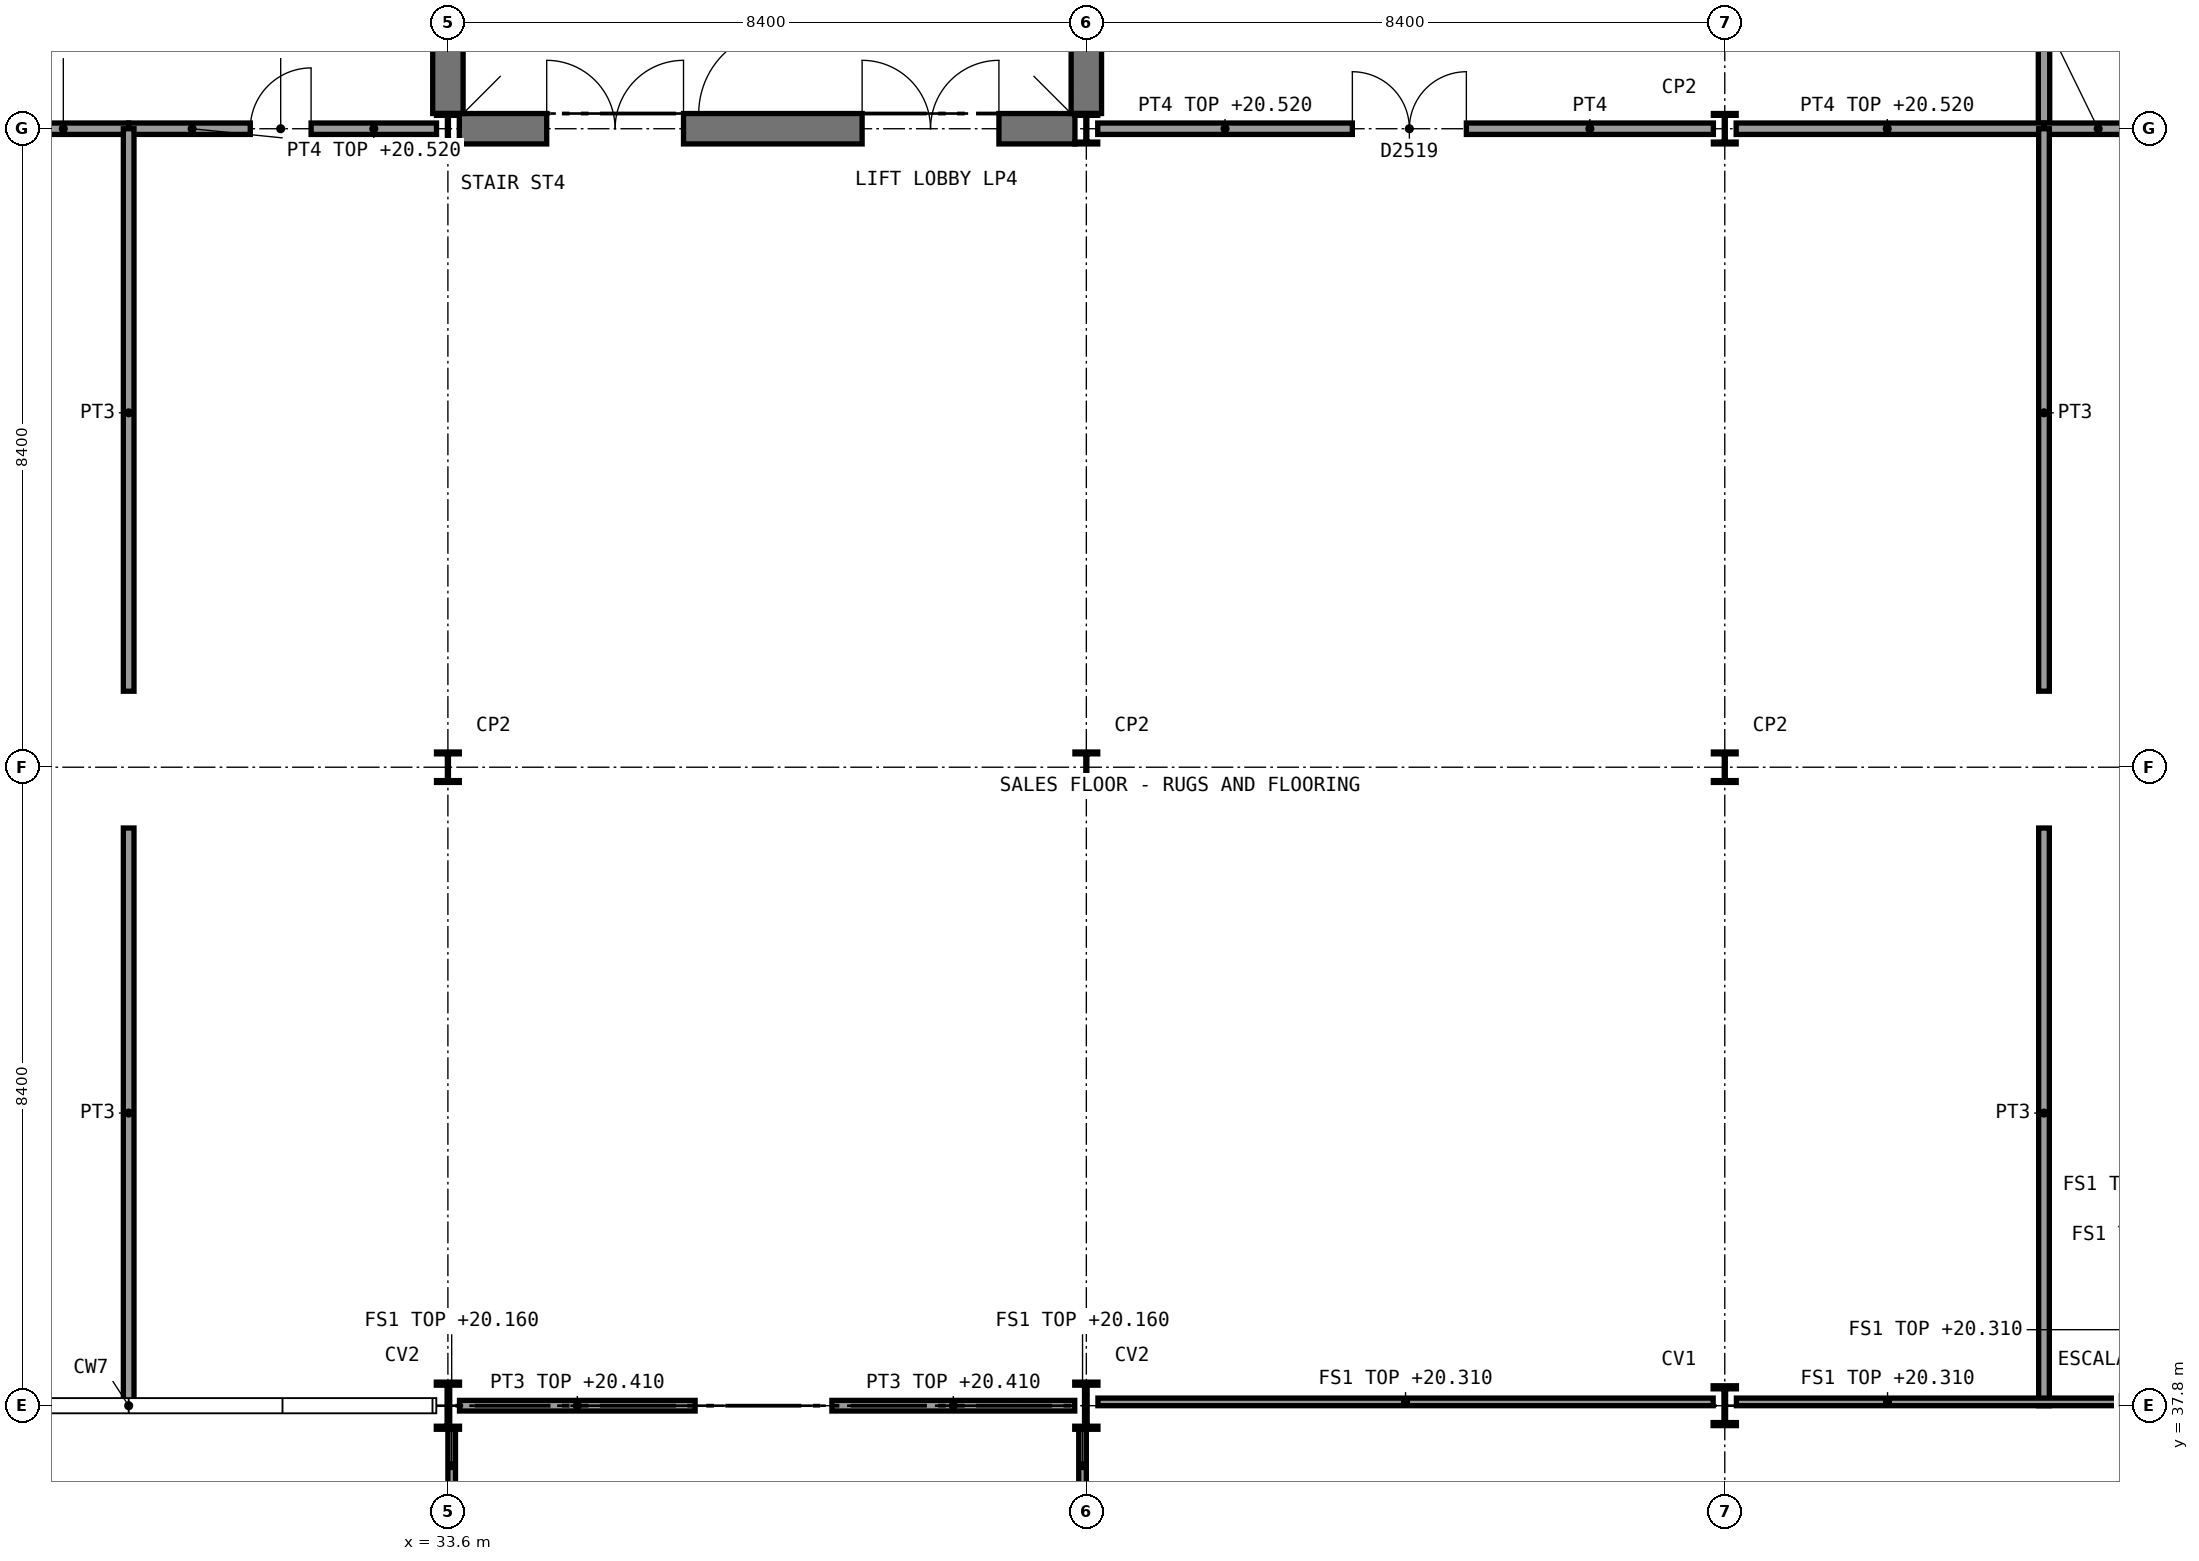
"""IFC4 building model, lengths in metres.
Left out: names, types, materials, properties, quantities, classifications, styles, units other than length and angle.
Written with IfcOpenShell. Run it as: python <this file> out.ifc"""

import sys

from ifc_helpers import new_model, si_unit, direction, frame, frame_2d, origin, origin_2d, place, context, subcontext, project, spatial, rectangle, i_section, extrude, element, fill, save


model = new_model("IFC4")
c1 = context("Model", 3, precision=1e-05, world=origin(), true_north=direction((0.0, 1.0)))
c2 = subcontext(c1, "Body", "Model", "MODEL_VIEW")
j1 = project(units=[si_unit("LENGTHUNIT", "METRE"), si_unit("PLANEANGLEUNIT", "RADIAN")], contexts=[c1])
p1 = place(None, origin())
s1 = spatial("IfcSite", under=j1, at=p1, CompositionType="ELEMENT")
p2 = place(p1, origin())
s2 = spatial("IfcBuilding", under=s1, at=p2, CompositionType="ELEMENT")
p3 = place(p2, frame((0.0, 0.0, 16.2)))
s3 = spatial("IfcBuildingStorey", under=s2, at=p3, CompositionType="ELEMENT", Elevation=16.2)
p4 = place(p3, frame((33.75, 54.6, 0.0), z_axis=(0.0, 0.0, 1.0), x_axis=(1.0, 0.0, 0.0)))
e1 = element("IfcWall", 1, at=p4, inside=s3, PredefinedType="SHEAR", context=c2, shape_type="SweptSolid", body=[
    extrude(rectangle(XDim=8.1, YDim=0.4, at=frame_2d((4.05, 0.0))), origin(), (0.0, 0.0, 1.0), 4.65),
])
p5 = place(p4, frame((1.15, 0.0, 0.0)))
e2 = element("IfcOpeningElement", 2, at=p5, cuts=e1, PredefinedType="OPENING", context=c2, shape_type="SweptSolid", body=[
    extrude(rectangle(XDim=1.8, YDim=2.1, at=frame_2d((0.9, 1.05))), frame((0.0, 0.21, 0.0), z_axis=(0.0, -1.0, 0.0), x_axis=(1.0, 0.0, 0.0)), (0.0, 0.0, 1.0), 0.42),
])
p6 = place(p4, frame((5.3, 0.0, 0.0)))
e3 = element("IfcOpeningElement", 3, at=p6, cuts=e1, PredefinedType="OPENING", context=c2, shape_type="SweptSolid", body=[
    extrude(rectangle(XDim=1.8, YDim=2.1, at=frame_2d((0.9, 1.05))), frame((0.0, 0.21, 0.0), z_axis=(0.0, -1.0, 0.0), x_axis=(1.0, 0.0, 0.0)), (0.0, 0.0, 1.0), 0.42),
])
for number, where, z_axis, x_axis in (
    (4, (33.6, 54.8, 0.0), (0.0, 0.0, 1.0), (0.0, 1.0, 0.0)),
    (5, (42.0, 54.8, 0.0), (0.0, 0.0, 1.0), (0.0, 1.0, 0.0)),
):
    element("IfcWall", number, at=place(p3, frame(where, z_axis=z_axis, x_axis=x_axis)), inside=s3, PredefinedType="SHEAR", context=c2, shape_type="SweptSolid", body=[
        extrude(rectangle(XDim=8.0, YDim=0.4, at=frame_2d((4.0, 0.0))), origin(), (0.0, 0.0, 1.0), 4.65),
    ])
p7 = place(p3, frame((33.6, 37.8, 0.0), z_axis=(0.0, 0.0, 1.0), x_axis=(1.0, 0.0, 0.0)))
e6 = element("IfcColumn", 6, at=p7, inside=s3, PredefinedType="COLUMN", context=c2, shape_type="SweptSolid", body=[
    extrude(i_section(OverallWidth=0.305, OverallDepth=0.62, WebThickness=0.021, FlangeThickness=0.04, FilletRadius=0.027, at=origin_2d()), origin(), (0.0, 0.0, 1.0), 4.8),
])
for number, where, z_axis, x_axis in (
    (7, (33.6, 46.2, 0.0), (0.0, 0.0, 1.0), (1.0, 0.0, 0.0)),
    (8, (33.6, 54.6, 0.0), (0.0, 0.0, 1.0), (1.0, 0.0, 0.0)),
):
    element("IfcColumn", number, at=place(p3, frame(where, z_axis=z_axis, x_axis=x_axis)), inside=s3, PredefinedType="COLUMN", context=c2, shape_type="SweptSolid", body=[
        extrude(i_section(OverallWidth=0.3, OverallDepth=0.4, WebThickness=0.013, FlangeThickness=0.024, FilletRadius=0.027, at=origin_2d()), origin(), (0.0, 0.0, 1.0), 4.8),
    ])
p8 = place(p3, frame((42.0, 37.8, 0.0), z_axis=(0.0, 0.0, 1.0), x_axis=(1.0, 0.0, 0.0)))
e9 = element("IfcColumn", 9, at=p8, inside=s3, PredefinedType="COLUMN", context=c2, shape_type="SweptSolid", body=[
    extrude(i_section(OverallWidth=0.305, OverallDepth=0.62, WebThickness=0.021, FlangeThickness=0.04, FilletRadius=0.027, at=origin_2d()), origin(), (0.0, 0.0, 1.0), 4.8),
])
for number, where, z_axis, x_axis in (
    (10, (42.0, 46.2, 0.0), (0.0, 0.0, 1.0), (1.0, 0.0, 0.0)),
    (11, (42.0, 54.6, 0.0), (0.0, 0.0, 1.0), (1.0, 0.0, 0.0)),
):
    element("IfcColumn", number, at=place(p3, frame(where, z_axis=z_axis, x_axis=x_axis)), inside=s3, PredefinedType="COLUMN", context=c2, shape_type="SweptSolid", body=[
        extrude(i_section(OverallWidth=0.3, OverallDepth=0.4, WebThickness=0.013, FlangeThickness=0.024, FilletRadius=0.027, at=origin_2d()), origin(), (0.0, 0.0, 1.0), 4.8),
    ])
p9 = place(p3, frame((50.4, 37.8, 0.0), z_axis=(0.0, 0.0, 1.0), x_axis=(1.0, 0.0, 0.0)))
e12 = element("IfcColumn", 12, at=p9, inside=s3, PredefinedType="COLUMN", context=c2, shape_type="SweptSolid", body=[
    extrude(i_section(OverallWidth=0.306, OverallDepth=0.524, WebThickness=0.021, FlangeThickness=0.04, FilletRadius=0.027, at=origin_2d()), origin(), (0.0, 0.0, 1.0), 4.8),
])
for number, where, z_axis, x_axis in (
    (13, (50.4, 46.2, 0.0), (0.0, 0.0, 1.0), (1.0, 0.0, 0.0)),
    (14, (50.4, 54.6, 0.0), (0.0, 0.0, 1.0), (1.0, 0.0, 0.0)),
):
    element("IfcColumn", number, at=place(p3, frame(where, z_axis=z_axis, x_axis=x_axis)), inside=s3, PredefinedType="COLUMN", context=c2, shape_type="SweptSolid", body=[
        extrude(i_section(OverallWidth=0.3, OverallDepth=0.4, WebThickness=0.013, FlangeThickness=0.024, FilletRadius=0.027, at=origin_2d()), origin(), (0.0, 0.0, 1.0), 4.8),
    ])
p10 = place(p3, frame((25.35, 54.6, 0.0), z_axis=(0.0, 0.0, 1.0), x_axis=(1.0, 0.0, 0.0)))
e15 = element("IfcWall", 15, at=p10, inside=s3, PredefinedType="SOLIDWALL", context=c2, shape_type="SweptSolid", body=[
    extrude(rectangle(XDim=4.05, YDim=0.15, at=frame_2d((2.025, 0.0))), origin(), (0.0, 0.0, 1.0), 4.32),
])
p11 = place(p10, frame((1.6, 0.0, 0.0)))
e16 = element("IfcOpeningElement", 16, at=p11, cuts=e15, PredefinedType="OPENING", context=c2, shape_type="SweptSolid", body=[
    extrude(rectangle(XDim=0.8, YDim=2.1, at=frame_2d((0.4, 1.05))), frame((0.0, 0.085, 0.0), z_axis=(0.0, -1.0, 0.0), x_axis=(1.0, 0.0, 0.0)), (0.0, 0.0, 1.0), 0.17),
])
p12 = place(p3, frame((29.4, 54.6, 0.0), z_axis=(0.0, 0.0, 1.0), x_axis=(1.0, 0.0, 0.0)))
e17 = element("IfcWall", 17, at=p12, inside=s3, PredefinedType="SOLIDWALL", context=c2, shape_type="SweptSolid", body=[
    extrude(rectangle(XDim=4.05, YDim=0.15, at=frame_2d((2.025, 0.0))), origin(), (0.0, 0.0, 1.0), 4.32),
])
p13 = place(p12, frame((1.6, 0.0, 0.0)))
e18 = element("IfcOpeningElement", 18, at=p13, cuts=e17, PredefinedType="OPENING", context=c2, shape_type="SweptSolid", body=[
    extrude(rectangle(XDim=0.8, YDim=2.1, at=frame_2d((0.4, 1.05))), frame((0.0, 0.085, 0.0), z_axis=(0.0, -1.0, 0.0), x_axis=(1.0, 0.0, 0.0)), (0.0, 0.0, 1.0), 0.17),
])
p14 = place(p3, frame((54.6, 54.6, 0.0), z_axis=(0.0, 0.0, 1.0), x_axis=(0.0, 1.0, 0.0)))
e19 = element("IfcWall", 19, at=p14, inside=s3, PredefinedType="SOLIDWALL", context=c2, shape_type="SweptSolid", body=[
    extrude(rectangle(XDim=8.4, YDim=0.15, at=frame_2d((4.2, 0.0))), origin(), (0.0, 0.0, 1.0), 4.65),
])
p15 = place(p3, frame((42.15, 54.6, 0.0), z_axis=(0.0, 0.0, 1.0), x_axis=(1.0, 0.0, 0.0)))
e20 = element("IfcWall", 20, at=p15, inside=s3, PredefinedType="SOLIDWALL", context=c2, shape_type="SweptSolid", body=[
    extrude(rectangle(XDim=8.1, YDim=0.15, at=frame_2d((4.05, 0.0))), origin(), (0.0, 0.0, 1.0), 4.32),
])
p16 = place(p15, frame((3.35, 0.0, 0.0)))
e21 = element("IfcOpeningElement", 21, at=p16, cuts=e20, PredefinedType="OPENING", context=c2, shape_type="SweptSolid", body=[
    extrude(rectangle(XDim=1.5, YDim=2.1, at=frame_2d((0.75, 1.05))), frame((0.0, 0.085, 0.0), z_axis=(0.0, -1.0, 0.0), x_axis=(1.0, 0.0, 0.0)), (0.0, 0.0, 1.0), 0.17),
])
p17 = place(p3, frame((50.55, 54.6, 0.0), z_axis=(0.0, 0.0, 1.0), x_axis=(1.0, 0.0, 0.0)))
e22 = element("IfcWall", 22, at=p17, inside=s3, PredefinedType="SOLIDWALL", context=c2, shape_type="SweptSolid", body=[
    extrude(rectangle(XDim=4.05, YDim=0.15, at=frame_2d((2.025, 0.0))), origin(), (0.0, 0.0, 1.0), 4.32),
])
p18 = place(p3, frame((54.6, 54.6, 0.0), z_axis=(0.0, 0.0, 1.0), x_axis=(1.0, 0.0, 0.0)))
e23 = element("IfcWall", 23, at=p18, inside=s3, PredefinedType="SOLIDWALL", context=c2, shape_type="SweptSolid", body=[
    extrude(rectangle(XDim=4.05, YDim=0.15, at=frame_2d((2.025, 0.0))), origin(), (0.0, 0.0, 1.0), 4.32),
])
p19 = place(p18, frame((1.35, 0.0, 0.0)))
e24 = element("IfcOpeningElement", 24, at=p19, cuts=e23, PredefinedType="OPENING", context=c2, shape_type="SweptSolid", body=[
    extrude(rectangle(XDim=1.5, YDim=2.1, at=frame_2d((0.75, 1.05))), frame((0.0, 0.085, 0.0), z_axis=(0.0, -1.0, 0.0), x_axis=(1.0, 0.0, 0.0)), (0.0, 0.0, 1.0), 0.17),
])
p20 = place(p3, frame((29.4, 37.8, 0.0), z_axis=(0.0, 0.0, 1.0), x_axis=(0.0, 1.0, 0.0)))
e25 = element("IfcWall", 25, at=p20, inside=s3, PredefinedType="PARTITIONING", context=c2, shape_type="SweptSolid", body=[
    extrude(rectangle(XDim=7.6, YDim=0.14, at=frame_2d((3.8, 0.0))), origin(), (0.0, 0.0, 1.0), 4.65),
])
p21 = place(p3, frame((29.4, 47.2, 0.0), z_axis=(0.0, 0.0, 1.0), x_axis=(0.0, 1.0, 0.0)))
e26 = element("IfcWall", 26, at=p21, inside=s3, PredefinedType="PARTITIONING", context=c2, shape_type="SweptSolid", body=[
    extrude(rectangle(XDim=7.4, YDim=0.14, at=frame_2d((3.7, 0.0))), origin(), (0.0, 0.0, 1.0), 4.65),
])
p22 = place(p3, frame((54.6, 37.8, 0.0), z_axis=(0.0, 0.0, 1.0), x_axis=(0.0, 1.0, 0.0)))
e27 = element("IfcWall", 27, at=p22, inside=s3, PredefinedType="PARTITIONING", context=c2, shape_type="SweptSolid", body=[
    extrude(rectangle(XDim=7.6, YDim=0.14, at=frame_2d((3.8, 0.0))), origin(), (0.0, 0.0, 1.0), 4.65),
])
p23 = place(p3, frame((54.6, 47.2, 0.0), z_axis=(0.0, 0.0, 1.0), x_axis=(0.0, 1.0, 0.0)))
e28 = element("IfcWall", 28, at=p23, inside=s3, PredefinedType="PARTITIONING", context=c2, shape_type="SweptSolid", body=[
    extrude(rectangle(XDim=7.4, YDim=0.14, at=frame_2d((3.7, 0.0))), origin(), (0.0, 0.0, 1.0), 4.65),
])
p24 = place(p3, frame((33.753, 37.8, 0.0), z_axis=(0.0, 0.0, 1.0), x_axis=(1.0, 0.0, 0.0)))
e29 = element("IfcWall", 29, at=p24, inside=s3, PredefinedType="PARTITIONING", context=c2, shape_type="SweptSolid", body=[
    extrude(rectangle(XDim=3.1, YDim=0.14, at=frame_2d((1.55, 0.0))), origin(), (0.0, 0.0, 1.0), 4.21),
])
p25 = place(p3, frame((38.653, 37.8, 0.0), z_axis=(0.0, 0.0, 1.0), x_axis=(1.0, 0.0, 0.0)))
e30 = element("IfcWall", 30, at=p25, inside=s3, PredefinedType="PARTITIONING", context=c2, shape_type="SweptSolid", body=[
    extrude(rectangle(XDim=3.195, YDim=0.14, at=frame_2d((1.597, 0.0))), origin(), (0.0, 0.0, 1.0), 4.21),
])
p26 = place(p3, frame((38.0, 62.8, 0.0), z_axis=(0.0, 0.0, 1.0), x_axis=(0.0, -1.0, 0.0)))
e31 = element("IfcWall", 31, at=p26, inside=s3, PredefinedType="SHEAR", context=c2, shape_type="SweptSolid", body=[
    extrude(rectangle(XDim=8.0, YDim=0.2, at=frame_2d((4.0, 0.0))), origin(), (0.0, 0.0, 1.0), 4.65),
])
p27 = place(p26, frame((6.9, 0.0, 0.0)))
e32 = element("IfcOpeningElement", 32, at=p27, cuts=e31, PredefinedType="OPENING", context=c2, shape_type="SweptSolid", body=[
    extrude(rectangle(XDim=1.11, YDim=2.1, at=frame_2d((0.555, 1.05))), frame((0.0, 0.11, 0.0), z_axis=(0.0, -1.0, 0.0), x_axis=(1.0, 0.0, 0.0)), (0.0, 0.0, 1.0), 0.22),
])
p28 = place(p3, frame((42.153, 37.85, 0.0), z_axis=(0.0, 0.0, 1.0), x_axis=(1.0, 0.0, 0.0)))
e33 = element("IfcWall", 33, at=p28, inside=s3, PredefinedType="PARTITIONING", context=c2, shape_type="SweptSolid", body=[
    extrude(rectangle(XDim=8.094, YDim=0.1, at=frame_2d((4.047, 0.0))), origin(), (0.0, 0.0, 1.0), 4.11),
])
p29 = place(p3, frame((50.553, 37.85, 0.0), z_axis=(0.0, 0.0, 1.0), x_axis=(1.0, 0.0, 0.0)))
e34 = element("IfcWall", 34, at=p29, inside=s3, PredefinedType="PARTITIONING", context=c2, shape_type="SweptSolid", body=[
    extrude(rectangle(XDim=5.097, YDim=0.1, at=frame_2d((2.549, 0.0))), origin(), (0.0, 0.0, 1.0), 4.11),
])
for number, where, z_axis, x_axis in (
    (35, (33.65, 25.51, 0.0), (0.0, 0.0, 1.0), (0.0, 1.0, 0.0)),
    (36, (41.95, 25.51, 0.0), (0.0, 0.0, 1.0), (0.0, 1.0, 0.0)),
):
    element("IfcWall", number, at=place(p3, frame(where, z_axis=z_axis, x_axis=x_axis)), inside=s3, PredefinedType="PARTITIONING", context=c2, shape_type="SweptSolid", body=[
        extrude(rectangle(XDim=11.98, YDim=0.1, at=frame_2d((5.99, 0.0))), origin(), (0.0, 0.0, 1.0), 3.96),
    ])
p30 = place(p13, origin())
e37 = element("IfcDoor", 37, at=p30, inside=s3, OperationType="SINGLE_SWING_RIGHT", PredefinedType="DOOR", context=c2, shape_type="SweptSolid", body=[
    extrude(rectangle(XDim=0.8, YDim=2.1, at=frame_2d((0.4, 1.05))), frame((0.0, 0.025, 0.0), z_axis=(0.0, -1.0, 0.0), x_axis=(1.0, 0.0, 0.0)), (0.0, 0.0, 1.0), 0.05),
])
fill(e18, e37)
p31 = place(p16, origin())
e38 = element("IfcDoor", 38, at=p31, inside=s3, OperationType="DOUBLE_DOOR_SINGLE_SWING", PredefinedType="DOOR", context=c2, shape_type="SweptSolid", body=[
    extrude(rectangle(XDim=1.5, YDim=2.1, at=frame_2d((0.75, 1.05))), frame((0.0, 0.025, 0.0), z_axis=(0.0, -1.0, 0.0), x_axis=(1.0, 0.0, 0.0)), (0.0, 0.0, 1.0), 0.05),
])
fill(e21, e38)
p32 = place(p27, frame((1.1, 0.0, 0.0), z_axis=(0.0, 0.0, 1.0), x_axis=(-1.0, 0.0, 0.0)))
e39 = element("IfcDoor", 39, at=p32, inside=s3, OperationType="SINGLE_SWING_LEFT", PredefinedType="DOOR", context=c2, shape_type="SweptSolid", body=[
    extrude(rectangle(XDim=1.1, YDim=2.1, at=frame_2d((0.55, 1.05))), frame((0.0, 0.025, 0.0), z_axis=(0.0, -1.0, 0.0), x_axis=(1.0, 0.0, 0.0)), (0.0, 0.0, 1.0), 0.05),
])
fill(e32, e39)
p33 = place(p5, origin())
e40 = element("IfcDoor", 40, at=p33, inside=s3, OperationType="DOUBLE_DOOR_SINGLE_SWING", PredefinedType="DOOR", context=c2, shape_type="SweptSolid", body=[
    extrude(rectangle(XDim=1.8, YDim=2.1, at=frame_2d((0.9, 1.05))), frame((0.0, 0.025, 0.0), z_axis=(0.0, -1.0, 0.0), x_axis=(1.0, 0.0, 0.0)), (0.0, 0.0, 1.0), 0.05),
])
fill(e2, e40)
p34 = place(p6, origin())
e41 = element("IfcDoor", 41, at=p34, inside=s3, OperationType="DOUBLE_DOOR_SINGLE_SWING", PredefinedType="DOOR", context=c2, shape_type="SweptSolid", body=[
    extrude(rectangle(XDim=1.8, YDim=2.1, at=frame_2d((0.9, 1.05))), frame((0.0, 0.025, 0.0), z_axis=(0.0, -1.0, 0.0), x_axis=(1.0, 0.0, 0.0)), (0.0, 0.0, 1.0), 0.05),
])
fill(e3, e41)
save(model, sys.argv[1])
